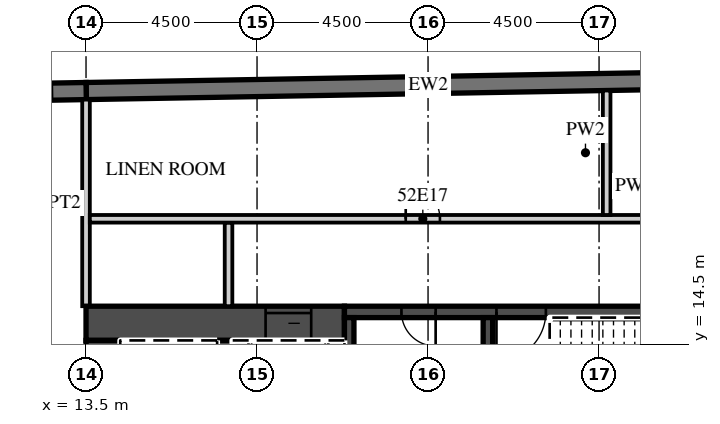
"""IFC4 building model, lengths in metres.
Left out: names, types, materials, properties, quantities, classifications, styles, units other than length and angle.
Written with IfcOpenShell. Run it as: python <this file> out.ifc"""

import sys

from ifc_helpers import new_model, si_unit, direction, frame, frame_2d, origin, place, context, subcontext, project, spatial, rectangle, extrude, element, fill, save


model = new_model("IFC4")
c1 = context("Model", 3, precision=1e-05, world=origin(), true_north=direction((0.0, 1.0)))
c2 = subcontext(c1, "Body", "Model", "MODEL_VIEW")
j1 = project(units=[si_unit("LENGTHUNIT", "METRE"), si_unit("PLANEANGLEUNIT", "RADIAN")], contexts=[c1])
p1 = place(None, origin())
s1 = spatial("IfcSite", under=j1, at=p1, CompositionType="ELEMENT")
p2 = place(p1, origin())
s2 = spatial("IfcBuilding", under=s1, at=p2, CompositionType="ELEMENT")
p3 = place(p2, frame((0.0, 0.0, 217.7)))
s3 = spatial("IfcBuildingStorey", under=s2, at=p3, CompositionType="ELEMENT", Elevation=217.7)
p4 = place(p3, frame((31.504, 21.476, 0.0), z_axis=(0.0, 0.0, 1.0), x_axis=(-0.999847677887, -0.017453395744, 0.0)))
e1 = element("IfcWall", 1, at=p4, inside=s3, PredefinedType="SOLIDWALL", context=c2, shape_type="SweptSolid", body=[
    extrude(rectangle(XDim=18.003, YDim=0.45, at=frame_2d((9.001, 0.0))), origin(), (0.0, 0.0, 1.0), 3.02),
])
p5 = place(p3, frame((13.504, 21.161, 0.0), z_axis=(0.0, 0.0, 1.0), x_axis=(-0.999847763257, -0.017448504532, 0.0)))
e2 = element("IfcWall", 2, at=p5, inside=s3, PredefinedType="SOLIDWALL", context=c2, shape_type="SweptSolid", body=[
    extrude(rectangle(XDim=46.859, YDim=0.45, at=frame_2d((23.43, 0.0))), origin(), (0.0, 0.0, 1.0), 3.02),
])
p6 = place(p5, frame((0.9, 0.0, 0.45)))
e3 = element("IfcOpeningElement", 3, at=p6, cuts=e2, PredefinedType="OPENING", context=c2, shape_type="SweptSolid", body=[
    extrude(rectangle(XDim=2.7, YDim=2.25, at=frame_2d((1.35, 1.125))), frame((0.0, 0.235, 0.0), z_axis=(0.0, -1.0, 0.0), x_axis=(1.0, 0.0, 0.0)), (0.0, 0.0, 1.0), 0.47),
])
p7 = place(p5, frame((5.401, 0.0, 0.45)))
e4 = element("IfcOpeningElement", 4, at=p7, cuts=e2, PredefinedType="OPENING", context=c2, shape_type="SweptSolid", body=[
    extrude(rectangle(XDim=2.7, YDim=2.25, at=frame_2d((1.35, 1.125))), frame((0.0, 0.235, 0.0), z_axis=(0.0, -1.0, 0.0), x_axis=(1.0, 0.0, 0.0)), (0.0, 0.0, 1.0), 0.47),
])
p8 = place(p5, frame((9.902, 0.0, 0.45)))
e5 = element("IfcOpeningElement", 5, at=p8, cuts=e2, PredefinedType="OPENING", context=c2, shape_type="SweptSolid", body=[
    extrude(rectangle(XDim=2.7, YDim=2.25, at=frame_2d((1.35, 1.125))), frame((0.0, 0.235, 0.0), z_axis=(0.0, -1.0, 0.0), x_axis=(1.0, 0.0, 0.0)), (0.0, 0.0, 1.0), 0.47),
])
p9 = place(p5, frame((14.402, 0.0, 0.45)))
e6 = element("IfcOpeningElement", 6, at=p9, cuts=e2, PredefinedType="OPENING", context=c2, shape_type="SweptSolid", body=[
    extrude(rectangle(XDim=2.7, YDim=2.25, at=frame_2d((1.35, 1.125))), frame((0.0, 0.235, 0.0), z_axis=(0.0, -1.0, 0.0), x_axis=(1.0, 0.0, 0.0)), (0.0, 0.0, 1.0), 0.47),
])
p10 = place(p5, frame((18.903, 0.0, 0.45)))
e7 = element("IfcOpeningElement", 7, at=p10, cuts=e2, PredefinedType="OPENING", context=c2, shape_type="SweptSolid", body=[
    extrude(rectangle(XDim=2.7, YDim=2.25, at=frame_2d((1.35, 1.125))), frame((0.0, 0.235, 0.0), z_axis=(0.0, -1.0, 0.0), x_axis=(1.0, 0.0, 0.0)), (0.0, 0.0, 1.0), 0.47),
])
p11 = place(p5, frame((23.404, 0.0, 0.45)))
e8 = element("IfcOpeningElement", 8, at=p11, cuts=e2, PredefinedType="OPENING", context=c2, shape_type="SweptSolid", body=[
    extrude(rectangle(XDim=2.7, YDim=2.25, at=frame_2d((1.35, 1.125))), frame((0.0, 0.235, 0.0), z_axis=(0.0, -1.0, 0.0), x_axis=(1.0, 0.0, 0.0)), (0.0, 0.0, 1.0), 0.47),
])
p12 = place(p5, frame((27.904, 0.0, 0.45)))
e9 = element("IfcOpeningElement", 9, at=p12, cuts=e2, PredefinedType="OPENING", context=c2, shape_type="SweptSolid", body=[
    extrude(rectangle(XDim=2.7, YDim=2.25, at=frame_2d((1.35, 1.125))), frame((0.0, 0.235, 0.0), z_axis=(0.0, -1.0, 0.0), x_axis=(1.0, 0.0, 0.0)), (0.0, 0.0, 1.0), 0.47),
])
p13 = place(p5, frame((32.405, 0.0, 0.45)))
e10 = element("IfcOpeningElement", 10, at=p13, cuts=e2, PredefinedType="OPENING", context=c2, shape_type="SweptSolid", body=[
    extrude(rectangle(XDim=2.7, YDim=2.25, at=frame_2d((1.35, 1.125))), frame((0.0, 0.235, 0.0), z_axis=(0.0, -1.0, 0.0), x_axis=(1.0, 0.0, 0.0)), (0.0, 0.0, 1.0), 0.47),
])
p14 = place(p5, frame((36.906, 0.0, 0.45)))
e11 = element("IfcOpeningElement", 11, at=p14, cuts=e2, PredefinedType="OPENING", context=c2, shape_type="SweptSolid", body=[
    extrude(rectangle(XDim=2.7, YDim=2.25, at=frame_2d((1.35, 1.125))), frame((0.0, 0.235, 0.0), z_axis=(0.0, -1.0, 0.0), x_axis=(1.0, 0.0, 0.0)), (0.0, 0.0, 1.0), 0.47),
])
p15 = place(p5, frame((41.406, 0.0, 0.45)))
e12 = element("IfcOpeningElement", 12, at=p15, cuts=e2, PredefinedType="OPENING", context=c2, shape_type="SweptSolid", body=[
    extrude(rectangle(XDim=2.7, YDim=2.25, at=frame_2d((1.35, 1.125))), frame((0.0, 0.235, 0.0), z_axis=(0.0, -1.0, 0.0), x_axis=(1.0, 0.0, 0.0)), (0.0, 0.0, 1.0), 0.47),
])
p16 = place(p3, frame((13.5, 15.5, 0.0), z_axis=(0.0, 0.0, 1.0), x_axis=(0.0, 1.0, 0.0)))
e13 = element("IfcWall", 13, at=p16, inside=s3, PredefinedType="PARTITIONING", context=c2, shape_type="SweptSolid", body=[
    extrude(rectangle(XDim=5.436, YDim=0.2, at=frame_2d((2.718, 0.0))), origin(), (0.0, 0.0, 1.0), 3.02),
])
p17 = place(p3, frame((13.5, 15.05, 0.0), z_axis=(0.0, 0.0, 1.0), x_axis=(1.0, 0.0, 0.0)))
e14 = element("IfcWall", 14, at=p17, inside=s3, PredefinedType="SHEAR", context=c2, shape_type="SweptSolid", body=[
    extrude(rectangle(XDim=6.8, YDim=0.9, at=frame_2d((3.4, 0.0))), origin(), (0.0, 0.0, 1.0), 3.02),
])
p18 = place(p17, frame((4.725, 0.0, 0.0)))
e15 = element("IfcOpeningElement", 15, at=p18, cuts=e14, PredefinedType="OPENING", context=c2, shape_type="SweptSolid", body=[
    extrude(rectangle(XDim=1.2, YDim=2.1, at=frame_2d((0.6, 1.05))), frame((0.0, 0.46, 0.0), z_axis=(0.0, -1.0, 0.0), x_axis=(1.0, 0.0, 0.0)), (0.0, 0.0, 1.0), 0.92),
])
p19 = place(p3, frame((20.3, 15.35, 0.0), z_axis=(0.0, 0.0, 1.0), x_axis=(1.0, 0.0, 0.0)))
e16 = element("IfcWall", 16, at=p19, inside=s3, PredefinedType="SHEAR", context=c2, shape_type="SweptSolid", body=[
    extrude(rectangle(XDim=10.3, YDim=0.3, at=frame_2d((5.15, 0.0))), origin(), (0.0, 0.0, 1.0), 3.02),
])
p20 = place(p19, frame((4.0, 0.0, 0.0)))
e17 = element("IfcOpeningElement", 17, at=p20, cuts=e16, PredefinedType="OPENING", context=c2, shape_type="SweptSolid", body=[
    extrude(rectangle(XDim=1.3, YDim=2.1, at=frame_2d((0.65, 1.05))), frame((0.0, 0.16, 0.0), z_axis=(0.0, -1.0, 0.0), x_axis=(1.0, 0.0, 0.0)), (0.0, 0.0, 1.0), 0.32),
])
p21 = place(p19, frame((1.5, 0.0, 0.0)))
e18 = element("IfcOpeningElement", 18, at=p21, cuts=e16, PredefinedType="OPENING", context=c2, shape_type="SweptSolid", body=[
    extrude(rectangle(XDim=0.9, YDim=2.1, at=frame_2d((0.45, 1.05))), frame((0.0, 0.16, 0.0), z_axis=(0.0, -1.0, 0.0), x_axis=(1.0, 0.0, 0.0)), (0.0, 0.0, 1.0), 0.32),
])
p22 = place(p3, frame((13.95, 2.4, 0.0), z_axis=(0.0, 0.0, 1.0), x_axis=(0.0, 1.0, 0.0)))
e19 = element("IfcWall", 19, at=p22, inside=s3, PredefinedType="SHEAR", context=c2, shape_type="SweptSolid", body=[
    extrude(rectangle(XDim=12.2, YDim=0.9, at=frame_2d((6.1, 0.0))), origin(), (0.0, 0.0, 1.0), 3.02),
])
p23 = place(p3, frame((17.15, 8.8, 0.0), z_axis=(0.0, 0.0, 1.0), x_axis=(0.0, 1.0, 0.0)))
e20 = element("IfcWall", 20, at=p23, inside=s3, PredefinedType="SHEAR", context=c2, shape_type="SweptSolid", body=[
    extrude(rectangle(XDim=5.8, YDim=0.4, at=frame_2d((2.9, 0.0))), origin(), (0.0, 0.0, 1.0), 3.02),
])
for number, where, z_axis, x_axis in (
    (21, (20.425, 11.95, 0.0), (0.0, 0.0, 1.0), (0.0, 1.0, 0.0)),
    (22, (24.075, 11.95, 0.0), (0.0, 0.0, 1.0), (0.0, 1.0, 0.0)),
):
    element("IfcWall", number, at=place(p3, frame(where, z_axis=z_axis, x_axis=x_axis)), inside=s3, PredefinedType="SHEAR", context=c2, shape_type="SweptSolid", body=[
        extrude(rectangle(XDim=3.25, YDim=0.25, at=frame_2d((1.625, 0.0))), origin(), (0.0, 0.0, 1.0), 3.02),
    ])
p24 = place(p3, frame((17.25, 15.5, 0.0), z_axis=(0.0, 0.0, 1.0), x_axis=(0.0, 1.0, 0.0)))
e23 = element("IfcWall", 23, at=p24, inside=s3, PredefinedType="PARTITIONING", context=c2, shape_type="SweptSolid", body=[
    extrude(rectangle(XDim=2.2, YDim=0.2, at=frame_2d((1.1, 0.0))), origin(), (0.0, 0.0, 1.0), 3.02),
])
p25 = place(p3, frame((13.6, 17.8, 0.0), z_axis=(0.0, 0.0, 1.0), x_axis=(1.0, 0.0, 0.0)))
e24 = element("IfcWall", 24, at=p25, inside=s3, PredefinedType="PARTITIONING", context=c2, shape_type="SweptSolid", body=[
    extrude(rectangle(XDim=28.657, YDim=0.2, at=frame_2d((14.329, 0.0))), origin(), (0.0, 0.0, 1.0), 3.02),
])
p26 = place(p25, frame((16.613, 0.0, 0.0)))
e25 = element("IfcOpeningElement", 25, at=p26, cuts=e24, PredefinedType="OPENING", context=c2, shape_type="SweptSolid", body=[
    extrude(rectangle(XDim=0.9, YDim=2.1, at=frame_2d((0.45, 1.05))), frame((0.0, 0.11, 0.0), z_axis=(0.0, -1.0, 0.0), x_axis=(1.0, 0.0, 0.0)), (0.0, 0.0, 1.0), 0.22),
])
p27 = place(p25, frame((8.312, 0.0, 0.0)))
e26 = element("IfcOpeningElement", 26, at=p27, cuts=e24, PredefinedType="OPENING", context=c2, shape_type="SweptSolid", body=[
    extrude(rectangle(XDim=0.9, YDim=2.1, at=frame_2d((0.45, 1.05))), frame((0.0, 0.11, 0.0), z_axis=(0.0, -1.0, 0.0), x_axis=(1.0, 0.0, 0.0)), (0.0, 0.0, 1.0), 0.22),
])
p28 = place(p3, frame((27.2, 17.9, 0.0), z_axis=(0.0, 0.0, 1.0), x_axis=(0.0, 1.0, 0.0)))
e27 = element("IfcWall", 27, at=p28, inside=s3, PredefinedType="PARTITIONING", context=c2, shape_type="SweptSolid", body=[
    extrude(rectangle(XDim=3.276, YDim=0.2, at=frame_2d((1.638, 0.0))), origin(), (0.0, 0.0, 1.0), 3.02),
])
p29 = place(p6, origin())
e28 = element("IfcWindow", 28, at=p29, inside=s3, PartitioningType="SINGLE_PANEL", PredefinedType="WINDOW", context=c2, shape_type="SweptSolid", body=[
    extrude(rectangle(XDim=2.7, YDim=2.25, at=frame_2d((1.35, 1.125))), frame((0.0, 0.09, 0.0), z_axis=(0.0, -1.0, 0.0), x_axis=(1.0, 0.0, 0.0)), (0.0, 0.0, 1.0), 0.06),
])
fill(e3, e28)
p30 = place(p18, origin())
e29 = element("IfcDoor", 29, at=p30, inside=s3, OperationType="SLIDING_TO_LEFT", PredefinedType="DOOR", context=c2, shape_type="SweptSolid", body=[
    extrude(rectangle(XDim=1.2, YDim=2.1, at=frame_2d((0.6, 1.05))), frame((0.0, 0.025, 0.0), z_axis=(0.0, -1.0, 0.0), x_axis=(1.0, 0.0, 0.0)), (0.0, 0.0, 1.0), 0.05),
])
fill(e15, e29)
p31 = place(p20, origin())
e30 = element("IfcDoor", 30, at=p31, inside=s3, OperationType="SINGLE_SWING_LEFT", PredefinedType="DOOR", context=c2, shape_type="SweptSolid", body=[
    extrude(rectangle(XDim=1.3, YDim=2.1, at=frame_2d((0.65, 1.05))), frame((0.0, 0.025, 0.0), z_axis=(0.0, -1.0, 0.0), x_axis=(1.0, 0.0, 0.0)), (0.0, 0.0, 1.0), 0.05),
])
fill(e17, e30)
p32 = place(p21, origin())
e31 = element("IfcDoor", 31, at=p32, inside=s3, OperationType="SINGLE_SWING_RIGHT", PredefinedType="DOOR", context=c2, shape_type="SweptSolid", body=[
    extrude(rectangle(XDim=0.9, YDim=2.1, at=frame_2d((0.45, 1.05))), frame((0.0, 0.025, 0.0), z_axis=(0.0, -1.0, 0.0), x_axis=(1.0, 0.0, 0.0)), (0.0, 0.0, 1.0), 0.05),
])
fill(e18, e31)
p33 = place(p27, origin())
e32 = element("IfcDoor", 32, at=p33, inside=s3, OperationType="SINGLE_SWING_LEFT", PredefinedType="DOOR", context=c2, shape_type="SweptSolid", body=[
    extrude(rectangle(XDim=0.9, YDim=2.1, at=frame_2d((0.45, 1.05))), frame((0.0, 0.025, 0.0), z_axis=(0.0, -1.0, 0.0), x_axis=(1.0, 0.0, 0.0)), (0.0, 0.0, 1.0), 0.05),
])
fill(e26, e32)
save(model, sys.argv[1])
